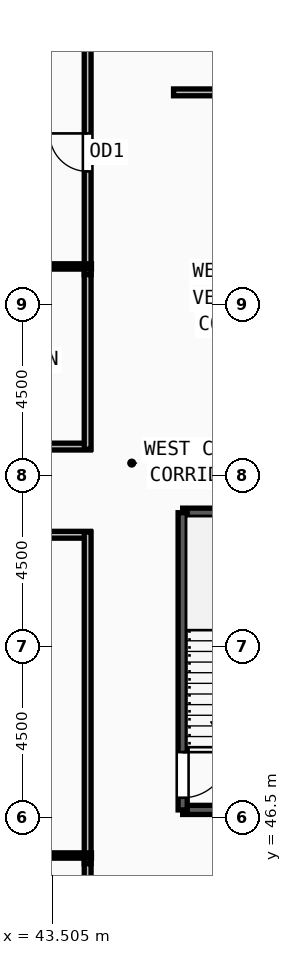
"""IFC4 building model, lengths in metres.
Left out: names, types, materials, properties, quantities, classifications, styles, units other than length and angle.
Written with IfcOpenShell. Run it as: python <this file> out.ifc"""

import sys

from ifc_helpers import new_model, si_unit, direction, frame, frame_2d, origin, place, context, subcontext, project, spatial, rectangle, extrude, source, transform, mapped, element, fill, save


model = new_model("IFC4")
c1 = context("Model", 3, precision=1e-05, world=origin(), true_north=direction((0.0, 1.0)))
c2 = subcontext(c1, "Body", "Model", "MODEL_VIEW")
j1 = project(units=[si_unit("LENGTHUNIT", "METRE"), si_unit("PLANEANGLEUNIT", "RADIAN")], contexts=[c1])
p1 = place(None, origin())
s1 = spatial("IfcSite", under=j1, at=p1, CompositionType="ELEMENT")
p2 = place(p1, origin())
s2 = spatial("IfcBuilding", under=s1, at=p2, CompositionType="ELEMENT")
p3 = place(p2, frame((0.0, 0.0, 155.25)))
s3 = spatial("IfcBuildingStorey", under=s2, at=p3, CompositionType="ELEMENT", Elevation=155.25)
for number, where, z_axis, x_axis in (
    (1, (46.94, 46.7, 0.0), (0.0, 0.0, 1.0), (1.0, 0.0, 0.0)),
    (2, (50.38, 54.52, 0.0), (0.0, 0.0, 1.0), (-1.0, 0.0, 0.0)),
):
    element("IfcWall", number, at=place(p3, frame(where, z_axis=z_axis, x_axis=x_axis)), inside=s3, PredefinedType="SOLIDWALL", context=c2, shape_type="SweptSolid", body=[
        extrude(rectangle(XDim=3.44, YDim=0.24, at=frame_2d((1.72, 0.0))), origin(), (0.0, 0.0, 1.0), 3.57),
    ])
p4 = place(p3, frame((46.94, 54.52, 0.0), z_axis=(0.0, 0.0, 1.0), x_axis=(0.0, -1.0, 0.0)))
e3 = element("IfcWall", 3, at=p4, inside=s3, PredefinedType="SOLIDWALL", context=c2, shape_type="SweptSolid", body=[
    extrude(rectangle(XDim=7.82, YDim=0.24, at=frame_2d((3.91, 0.0))), origin(), (0.0, 0.0, 1.0), 3.57),
])
m1 = source(origin(), c2, "Body", "SweptSolid", [
    extrude(rectangle(XDim=1.2, YDim=2.2, at=frame_2d((0.6, 1.1))), frame((0.0, 0.13, 0.0), z_axis=(0.0, -1.0, 0.0), x_axis=(1.0, 0.0, 0.0)), (0.0, 0.0, 1.0), 0.26),
])
p5 = place(p4, frame((6.3, 0.0, 0.0)))
e4 = element("IfcOpeningElement", 4, at=p5, cuts=e3, PredefinedType="OPENING", context=c2, shape_type="MappedRepresentation", body=[
    mapped(m1, transform((0.0, 0.0, 0.0), x_axis=(1.0, 0.0, 0.0), y_axis=(0.0, 1.0, 0.0), z_axis=(0.0, 0.0, 1.0), scale=1.0)),
])
p6 = place(p3, frame((46.7, 65.58, 0.0), z_axis=(0.0, 0.0, 1.0), x_axis=(1.0, 0.0, 0.0)))
e5 = element("IfcWall", 5, at=p6, inside=s3, PredefinedType="PARTITIONING", context=c2, shape_type="SweptSolid", body=[
    extrude(rectangle(XDim=3.84, YDim=0.18, at=frame_2d((1.92, 0.0))), origin(), (0.0, 0.0, 1.0), 3.57),
])
m2 = source(origin(), c2, "Body", "SweptSolid", [
    extrude(rectangle(XDim=1.3, YDim=2.2, at=frame_2d((0.65, 1.1))), frame((0.0, 0.1, 0.0), z_axis=(0.0, -1.0, 0.0), x_axis=(1.0, 0.0, 0.0)), (0.0, 0.0, 1.0), 0.2),
])
p7 = place(p6, frame((1.27, 0.0, 0.0)))
e6 = element("IfcOpeningElement", 6, at=p7, cuts=e5, PredefinedType="OPENING", context=c2, shape_type="MappedRepresentation", body=[
    mapped(m2, transform((0.0, 0.0, 0.0), x_axis=(1.0, 0.0, 0.0), y_axis=(0.0, 1.0, 0.0), z_axis=(0.0, 0.0, 1.0), scale=1.0)),
])
p8 = place(p3, frame((44.44, 60.785, 0.0), z_axis=(0.0, 0.0, 1.0), x_axis=(0.0, 1.0, 0.0)))
e7 = element("IfcWall", 7, at=p8, inside=s3, PredefinedType="PARTITIONING", context=c2, shape_type="SweptSolid", body=[
    extrude(rectangle(XDim=6.43, YDim=0.18, at=frame_2d((3.215, 0.0))), origin(), (0.0, 0.0, 1.0), 3.57),
])
m3 = source(origin(), c2, "Body", "SweptSolid", [
    extrude(rectangle(XDim=1.0, YDim=2.2, at=frame_2d((0.5, 1.1))), frame((0.0, 0.1, 0.0), z_axis=(0.0, -1.0, 0.0), x_axis=(1.0, 0.0, 0.0)), (0.0, 0.0, 1.0), 0.2),
])
p9 = place(p8, frame((2.715, 0.0, 0.0)))
e8 = element("IfcOpeningElement", 8, at=p9, cuts=e7, PredefinedType="OPENING", context=c2, shape_type="MappedRepresentation", body=[
    mapped(m3, transform((0.0, 0.0, 0.0), x_axis=(1.0, 0.0, 0.0), y_axis=(0.0, 1.0, 0.0), z_axis=(0.0, 0.0, 1.0), scale=1.0)),
])
p10 = place(p3, frame((29.988, 56.26, 0.0), z_axis=(0.0, 0.0, 1.0), x_axis=(1.0, 0.0, 0.0)))
e9 = element("IfcWall", 9, at=p10, inside=s3, PredefinedType="PARTITIONING", context=c2, shape_type="SweptSolid", body=[
    extrude(rectangle(XDim=14.522, YDim=0.18, at=frame_2d((7.261, 0.0))), origin(), (0.0, 0.0, 1.0), 3.57),
])
p11 = place(p10, frame((6.761, 0.0, 0.0)))
e10 = element("IfcOpeningElement", 10, at=p11, cuts=e9, PredefinedType="OPENING", context=c2, shape_type="MappedRepresentation", body=[
    mapped(m3, transform((0.0, 0.0, 0.0), x_axis=(1.0, 0.0, 0.0), y_axis=(0.0, 1.0, 0.0), z_axis=(0.0, 0.0, 1.0), scale=1.0)),
])
p12 = place(p3, frame((44.51, 53.94, 0.0), z_axis=(0.0, 0.0, 1.0), x_axis=(-1.0, 0.0, 0.0)))
e11 = element("IfcWall", 11, at=p12, inside=s3, PredefinedType="PARTITIONING", context=c2, shape_type="SweptSolid", body=[
    extrude(rectangle(XDim=13.362, YDim=0.18, at=frame_2d((6.681, 0.0))), origin(), (0.0, 0.0, 1.0), 3.57),
])
p13 = place(p12, frame((6.181, 0.0, 0.0)))
e12 = element("IfcOpeningElement", 12, at=p13, cuts=e11, PredefinedType="OPENING", context=c2, shape_type="MappedRepresentation", body=[
    mapped(m3, transform((0.0, 0.0, 0.0), x_axis=(1.0, 0.0, 0.0), y_axis=(0.0, 1.0, 0.0), z_axis=(0.0, 0.0, 1.0), scale=1.0)),
])
p14 = place(p3, frame((44.44, 56.19, 0.0), z_axis=(0.0, 0.0, 1.0), x_axis=(0.0, 1.0, 0.0)))
e13 = element("IfcWall", 13, at=p14, inside=s3, PredefinedType="PARTITIONING", context=c2, shape_type="SweptSolid", body=[
    extrude(rectangle(XDim=4.595, YDim=0.18, at=frame_2d((2.297, 0.0))), origin(), (0.0, 0.0, 1.0), 3.57),
])
p15 = place(p3, frame((44.44, 45.285, 0.0), z_axis=(0.0, 0.0, 1.0), x_axis=(0.0, 1.0, 0.0)))
e14 = element("IfcWall", 14, at=p15, inside=s3, PredefinedType="PARTITIONING", context=c2, shape_type="SweptSolid", body=[
    extrude(rectangle(XDim=8.725, YDim=0.18, at=frame_2d((4.363, 0.0))), origin(), (0.0, 0.0, 1.0), 3.57),
])
p16 = place(p3, frame((44.44, 43.67, 0.0), z_axis=(0.0, 0.0, 1.0), x_axis=(0.0, 1.0, 0.0)))
e15 = element("IfcWall", 15, at=p16, inside=s3, PredefinedType="PARTITIONING", context=c2, shape_type="SweptSolid", body=[
    extrude(rectangle(XDim=1.615, YDim=0.18, at=frame_2d((0.808, 0.0))), origin(), (0.0, 0.0, 1.0), 3.57),
])
p17 = place(p3, frame((44.54, 45.5, 0.0), z_axis=(0.0, 0.0, 1.0), x_axis=(-1.0, 0.0, 0.0)))
e16 = element("IfcWall", 16, at=p17, inside=s3, PredefinedType="PARTITIONING", context=c2, shape_type="SweptSolid", body=[
    extrude(rectangle(XDim=9.279, YDim=0.14, at=frame_2d((4.64, 0.0))), origin(), (0.0, 0.0, 1.0), 3.57),
])
p18 = place(p3, frame((44.54, 61.0, 0.0), z_axis=(0.0, 0.0, 1.0), x_axis=(-1.0, 0.0, 0.0)))
e17 = element("IfcWall", 17, at=p18, inside=s3, PredefinedType="PARTITIONING", context=c2, shape_type="SweptSolid", body=[
    extrude(rectangle(XDim=17.032, YDim=0.14, at=frame_2d((8.516, 0.0))), origin(), (0.0, 0.0, 1.0), 3.57),
])
m4 = source(origin(), c2, "Body", "SweptSolid", [
    extrude(rectangle(XDim=1.2, YDim=2.2, at=frame_2d((0.6, 1.1))), frame((0.0, 0.025, 0.0), z_axis=(0.0, -1.0, 0.0), x_axis=(1.0, 0.0, 0.0)), (0.0, 0.0, 1.0), 0.05),
])
p19 = place(p5, origin())
e18 = element("IfcDoor", 18, at=p19, inside=s3, OperationType="SINGLE_SWING_LEFT", PredefinedType="DOOR", context=c2, shape_type="MappedRepresentation", body=[
    mapped(m4, transform((0.0, 0.0, 0.0), x_axis=(1.0, 0.0, 0.0), y_axis=(0.0, 1.0, 0.0), z_axis=(0.0, 0.0, 1.0), scale=1.0)),
])
fill(e4, e18)
m5 = source(origin(), c2, "Body", "SweptSolid", [
    extrude(rectangle(XDim=1.0, YDim=2.2, at=frame_2d((0.5, 1.1))), frame((0.0, 0.025, 0.0), z_axis=(0.0, -1.0, 0.0), x_axis=(1.0, 0.0, 0.0)), (0.0, 0.0, 1.0), 0.05),
])
p20 = place(p9, origin())
e19 = element("IfcDoor", 19, at=p20, inside=s3, OperationType="SINGLE_SWING_RIGHT", PredefinedType="DOOR", context=c2, shape_type="MappedRepresentation", body=[
    mapped(m5, transform((0.0, 0.0, 0.0), x_axis=(1.0, 0.0, 0.0), y_axis=(0.0, 1.0, 0.0), z_axis=(0.0, 0.0, 1.0), scale=1.0)),
])
fill(e8, e19)
save(model, sys.argv[1])
